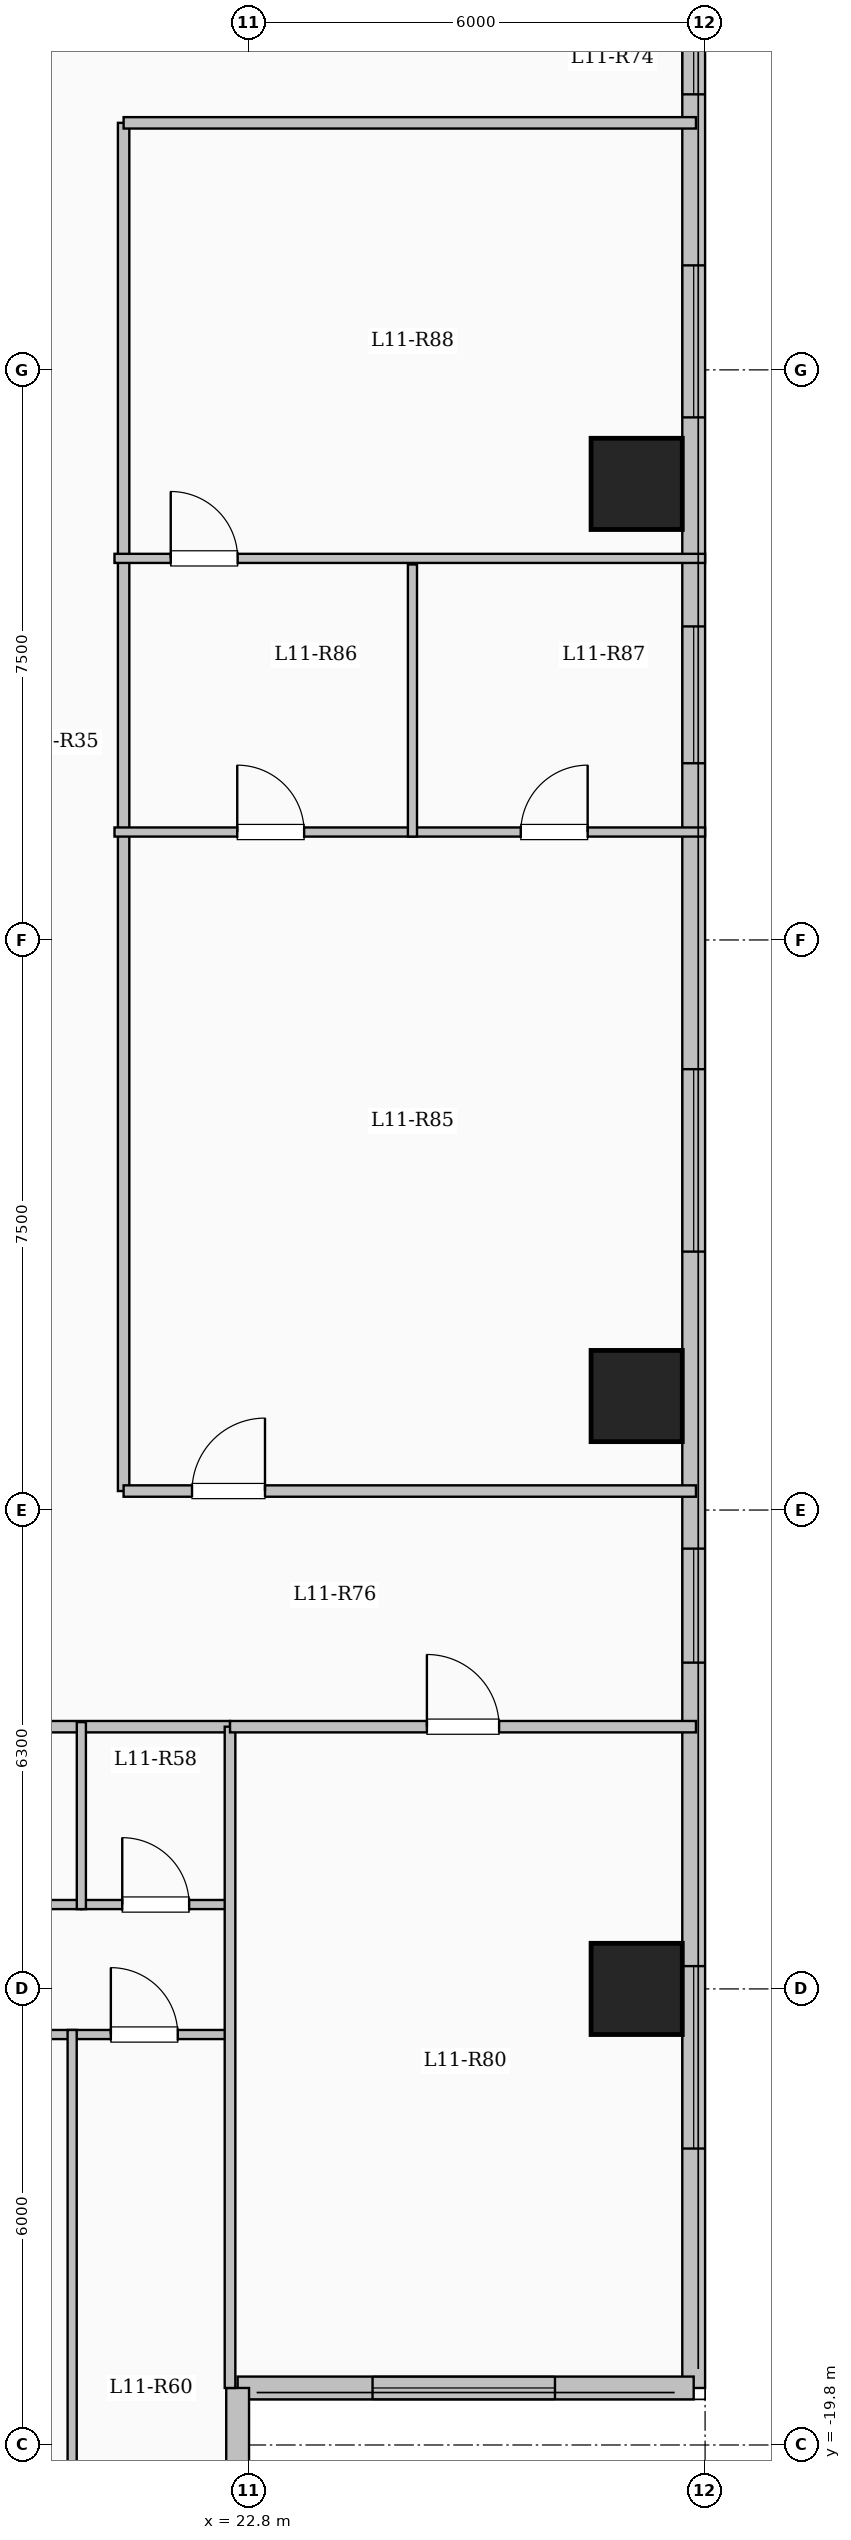
"""IFC4 building model, lengths in metres.
Left out: names, types, materials, properties, quantities, classifications, styles, units other than length and angle.
Written with IfcOpenShell. Run it as: python <this file> out.ifc"""

import sys

from ifc_helpers import new_model, si_unit, direction, frame, frame_2d, origin, origin_2d, place, context, subcontext, project, spatial, rectangle, extrude, element, fill, save


model = new_model("IFC4")
c1 = context("Model", 3, precision=1e-05, world=origin(), true_north=direction((0.0, 1.0)))
c2 = subcontext(c1, "Body", "Model", "MODEL_VIEW")
j1 = project(units=[si_unit("LENGTHUNIT", "METRE"), si_unit("PLANEANGLEUNIT", "RADIAN")], contexts=[c1])
p1 = place(None, origin())
s1 = spatial("IfcSite", under=j1, at=p1, CompositionType="ELEMENT")
p2 = place(p1, origin())
s2 = spatial("IfcBuilding", under=s1, at=p2, CompositionType="ELEMENT")
p3 = place(p2, frame((0.0, 0.0, 44.1)))
s3 = spatial("IfcBuildingStorey", under=s2, at=p3, CompositionType="ELEMENT", Elevation=44.1)
for number, where, z_axis, x_axis in (
    (1, (27.9, -13.8, 0.0), (0.0, 0.0, 1.0), (1.0, 0.0, 0.0)),
    (2, (27.9, -6.0, 0.0), (0.0, 0.0, 1.0), (1.0, 0.0, 0.0)),
    (3, (27.9, 6.0, 0.0), (0.0, 0.0, 1.0), (1.0, 0.0, 0.0)),
):
    element("IfcColumn", number, at=place(p3, frame(where, z_axis=z_axis, x_axis=x_axis)), inside=s3, PredefinedType="COLUMN", context=c2, shape_type="SweptSolid", body=[
        extrude(rectangle(XDim=1.2, YDim=1.2, at=origin_2d()), origin(), (0.0, 0.0, 1.0), 3.35),
    ])
p4 = place(p3, frame((28.65, 19.05, 0.0), z_axis=(0.0, 0.0, 1.0), x_axis=(0.0, -1.0, 0.0)))
e4 = element("IfcWall", 4, at=p4, inside=s3, PredefinedType="SOLIDWALL", context=c2, shape_type="SweptSolid", body=[
    extrude(rectangle(XDim=38.1, YDim=0.3, at=frame_2d((19.05, 0.0))), origin(), (0.0, 0.0, 1.0), 3.1),
])
p5 = place(p4, frame((2.275, 0.0, 0.9)))
e5 = element("IfcOpeningElement", 5, at=p5, cuts=e4, PredefinedType="OPENING", context=c2, shape_type="SweptSolid", body=[
    extrude(rectangle(XDim=2.0, YDim=1.7, at=frame_2d((1.0, 0.85))), frame((0.0, 0.16, 0.0), z_axis=(0.0, -1.0, 0.0), x_axis=(1.0, 0.0, 0.0)), (0.0, 0.0, 1.0), 0.32),
])
p6 = place(p4, frame((6.925, 0.0, 0.95)))
e6 = element("IfcOpeningElement", 6, at=p6, cuts=e4, PredefinedType="OPENING", context=c2, shape_type="SweptSolid", body=[
    extrude(rectangle(XDim=1.0, YDim=1.5, at=frame_2d((0.5, 0.75))), frame((0.0, 0.16, 0.0), z_axis=(0.0, -1.0, 0.0), x_axis=(1.0, 0.0, 0.0)), (0.0, 0.0, 1.0), 0.32),
])
p7 = place(p4, frame((10.175, 0.0, 0.9)))
e7 = element("IfcOpeningElement", 7, at=p7, cuts=e4, PredefinedType="OPENING", context=c2, shape_type="SweptSolid", body=[
    extrude(rectangle(XDim=2.0, YDim=1.7, at=frame_2d((1.0, 0.85))), frame((0.0, 0.16, 0.0), z_axis=(0.0, -1.0, 0.0), x_axis=(1.0, 0.0, 0.0)), (0.0, 0.0, 1.0), 0.32),
])
p8 = place(p4, frame((14.925, 0.0, 0.9)))
e8 = element("IfcOpeningElement", 8, at=p8, cuts=e4, PredefinedType="OPENING", context=c2, shape_type="SweptSolid", body=[
    extrude(rectangle(XDim=1.8, YDim=1.65, at=frame_2d((0.9, 0.825))), frame((0.0, 0.16, 0.0), z_axis=(0.0, -1.0, 0.0), x_axis=(1.0, 0.0, 0.0)), (0.0, 0.0, 1.0), 0.32),
])
p9 = place(p4, frame((20.75, 0.0, 0.9)))
e9 = element("IfcOpeningElement", 9, at=p9, cuts=e4, PredefinedType="OPENING", context=c2, shape_type="SweptSolid", body=[
    extrude(rectangle(XDim=2.4, YDim=1.8, at=frame_2d((1.2, 0.9))), frame((0.0, 0.16, 0.0), z_axis=(0.0, -1.0, 0.0), x_axis=(1.0, 0.0, 0.0)), (0.0, 0.0, 1.0), 0.32),
])
p10 = place(p4, frame((27.058, 0.0, 0.9)))
e10 = element("IfcOpeningElement", 10, at=p10, cuts=e4, PredefinedType="OPENING", context=c2, shape_type="SweptSolid", body=[
    extrude(rectangle(XDim=1.5, YDim=1.65, at=frame_2d((0.75, 0.825))), frame((0.0, 0.16, 0.0), z_axis=(0.0, -1.0, 0.0), x_axis=(1.0, 0.0, 0.0)), (0.0, 0.0, 1.0), 0.32),
])
p11 = place(p4, frame((32.55, 0.0, 0.9)))
e11 = element("IfcOpeningElement", 11, at=p11, cuts=e4, PredefinedType="OPENING", context=c2, shape_type="SweptSolid", body=[
    extrude(rectangle(XDim=2.4, YDim=1.8, at=frame_2d((1.2, 0.9))), frame((0.0, 0.16, 0.0), z_axis=(0.0, -1.0, 0.0), x_axis=(1.0, 0.0, 0.0)), (0.0, 0.0, 1.0), 0.32),
])
p12 = place(p3, frame((28.65, -19.05, 0.0), z_axis=(0.0, 0.0, 1.0), x_axis=(-1.0, 0.0, 0.0)))
e12 = element("IfcWall", 12, at=p12, inside=s3, PredefinedType="SOLIDWALL", context=c2, shape_type="SweptSolid", body=[
    extrude(rectangle(XDim=6.0, YDim=0.3, at=frame_2d((3.0, 0.0))), origin(), (0.0, 0.0, 1.0), 3.1),
])
p13 = place(p12, frame((1.825, 0.0, 0.9)))
e13 = element("IfcOpeningElement", 13, at=p13, cuts=e12, PredefinedType="OPENING", context=c2, shape_type="SweptSolid", body=[
    extrude(rectangle(XDim=2.4, YDim=1.8, at=frame_2d((1.2, 0.9))), frame((0.0, 0.16, 0.0), z_axis=(0.0, -1.0, 0.0), x_axis=(1.0, 0.0, 0.0)), (0.0, 0.0, 1.0), 0.32),
])
p14 = place(p3, frame((22.65, -19.05, 0.0), z_axis=(0.0, 0.0, 1.0), x_axis=(0.0, -1.0, 0.0)))
e14 = element("IfcWall", 14, at=p14, inside=s3, PredefinedType="SOLIDWALL", context=c2, shape_type="SweptSolid", body=[
    extrude(rectangle(XDim=4.5, YDim=0.3, at=frame_2d((2.25, 0.0))), origin(), (0.0, 0.0, 1.0), 3.1),
])
p15 = place(p14, frame((1.333, 0.0, 0.9)))
e15 = element("IfcOpeningElement", 15, at=p15, cuts=e14, PredefinedType="OPENING", context=c2, shape_type="SweptSolid", body=[
    extrude(rectangle(XDim=1.8, YDim=1.65, at=frame_2d((0.9, 0.825))), frame((0.0, 0.16, 0.0), z_axis=(0.0, -1.0, 0.0), x_axis=(1.0, 0.0, 0.0)), (0.0, 0.0, 1.0), 0.32),
])
p16 = place(p3, frame((21.15, -7.25, 0.0), z_axis=(0.0, 0.0, 1.0), x_axis=(0.0, 1.0, 0.0)))
e16 = element("IfcWall", 16, at=p16, inside=s3, PredefinedType="PARTITIONING", context=c2, shape_type="SweptSolid", body=[
    extrude(rectangle(XDim=18.0, YDim=0.15, at=frame_2d((9.0, 0.0))), origin(), (0.0, 0.0, 1.0), 2.585),
])
p17 = place(p3, frame((8.55, -10.35, 0.0), z_axis=(0.0, 0.0, 1.0), x_axis=(1.0, 0.0, 0.0)))
e17 = element("IfcWall", 17, at=p17, inside=s3, PredefinedType="PARTITIONING", context=c2, shape_type="SweptSolid", body=[
    extrude(rectangle(XDim=14.0, YDim=0.15, at=frame_2d((7.0, 0.0))), origin(), (0.0, 0.0, 1.0), 3.1),
])
p18 = place(p17, frame((0.75, 0.0, 0.0)))
e18 = element("IfcOpeningElement", 18, at=p18, cuts=e17, PredefinedType="OPENING", context=c2, shape_type="SweptSolid", body=[
    extrude(rectangle(XDim=0.96, YDim=2.15, at=frame_2d((0.48, 1.075))), frame((0.0, 0.085, 0.0), z_axis=(0.0, -1.0, 0.0), x_axis=(1.0, 0.0, 0.0)), (0.0, 0.0, 1.0), 0.17),
])
p19 = place(p17, frame((7.446, 0.0, 0.0)))
e19 = element("IfcOpeningElement", 19, at=p19, cuts=e17, PredefinedType="OPENING", context=c2, shape_type="SweptSolid", body=[
    extrude(rectangle(XDim=0.96, YDim=2.15, at=frame_2d((0.48, 1.075))), frame((0.0, 0.085, 0.0), z_axis=(0.0, -1.0, 0.0), x_axis=(1.0, 0.0, 0.0)), (0.0, 0.0, 1.0), 0.17),
])
p20 = place(p3, frame((18.456, -12.69, 0.0), z_axis=(0.0, 0.0, 1.0), x_axis=(1.0, 0.0, 0.0)))
e20 = element("IfcWall", 20, at=p20, inside=s3, PredefinedType="PARTITIONING", context=c2, shape_type="SweptSolid", body=[
    extrude(rectangle(XDim=2.138, YDim=0.12, at=frame_2d((1.069, 0.0))), origin(), (0.0, 0.0, 1.0), 3.1),
])
p21 = place(p20, frame((0.629, 0.0, 0.0)))
e21 = element("IfcOpeningElement", 21, at=p21, cuts=e20, PredefinedType="OPENING", context=c2, shape_type="SweptSolid", body=[
    extrude(rectangle(XDim=0.88, YDim=2.1, at=frame_2d((0.44, 1.05))), frame((0.0, 0.07, 0.0), z_axis=(0.0, -1.0, 0.0), x_axis=(1.0, 0.0, 0.0)), (0.0, 0.0, 1.0), 0.14),
])
p22 = place(p3, frame((20.594, -12.69, 0.0), z_axis=(0.0, 0.0, 1.0), x_axis=(1.0, 0.0, 0.0)))
e22 = element("IfcWall", 22, at=p22, inside=s3, PredefinedType="PARTITIONING", context=c2, shape_type="SweptSolid", body=[
    extrude(rectangle(XDim=1.956, YDim=0.12, at=frame_2d((0.978, 0.0))), origin(), (0.0, 0.0, 1.0), 3.1),
])
p23 = place(p22, frame((0.538, 0.0, 0.0)))
e23 = element("IfcOpeningElement", 23, at=p23, cuts=e22, PredefinedType="OPENING", context=c2, shape_type="SweptSolid", body=[
    extrude(rectangle(XDim=0.88, YDim=2.1, at=frame_2d((0.44, 1.05))), frame((0.0, 0.07, 0.0), z_axis=(0.0, -1.0, 0.0), x_axis=(1.0, 0.0, 0.0)), (0.0, 0.0, 1.0), 0.14),
])
p24 = place(p3, frame((18.396, -14.4, 0.0), z_axis=(0.0, 0.0, 1.0), x_axis=(1.0, 0.0, 0.0)))
e24 = element("IfcWall", 24, at=p24, inside=s3, PredefinedType="PARTITIONING", context=c2, shape_type="SweptSolid", body=[
    extrude(rectangle(XDim=4.214, YDim=0.12, at=frame_2d((2.107, 0.0))), origin(), (0.0, 0.0, 1.0), 3.1),
])
p25 = place(p24, frame((0.569, 0.0, 0.0)))
e25 = element("IfcOpeningElement", 25, at=p25, cuts=e24, PredefinedType="OPENING", context=c2, shape_type="SweptSolid", body=[
    extrude(rectangle(XDim=0.88, YDim=2.1, at=frame_2d((0.44, 1.05))), frame((0.0, 0.07, 0.0), z_axis=(0.0, -1.0, 0.0), x_axis=(1.0, 0.0, 0.0)), (0.0, 0.0, 1.0), 0.14),
])
p26 = place(p24, frame((2.586, 0.0, 0.0)))
e26 = element("IfcOpeningElement", 26, at=p26, cuts=e24, PredefinedType="OPENING", context=c2, shape_type="SweptSolid", body=[
    extrude(rectangle(XDim=0.88, YDim=2.1, at=frame_2d((0.44, 1.05))), frame((0.0, 0.07, 0.0), z_axis=(0.0, -1.0, 0.0), x_axis=(1.0, 0.0, 0.0)), (0.0, 0.0, 1.0), 0.14),
])
p27 = place(p3, frame((20.594, -12.75, 0.0), z_axis=(0.0, 0.0, 1.0), x_axis=(0.0, 1.0, 0.0)))
e27 = element("IfcWall", 27, at=p27, inside=s3, PredefinedType="PARTITIONING", context=c2, shape_type="SweptSolid", body=[
    extrude(rectangle(XDim=2.46, YDim=0.12, at=frame_2d((1.23, 0.0))), origin(), (0.0, 0.0, 1.0), 3.1),
])
p28 = place(p3, frame((20.473, -23.6, 0.0), z_axis=(0.0, 0.0, 1.0), x_axis=(0.0, 1.0, 0.0)))
e28 = element("IfcWall", 28, at=p28, inside=s3, PredefinedType="PARTITIONING", context=c2, shape_type="SweptSolid", body=[
    extrude(rectangle(XDim=9.26, YDim=0.12, at=frame_2d((4.63, 0.0))), origin(), (0.0, 0.0, 1.0), 3.1),
])
p29 = place(p3, frame((21.15, -7.25, 0.0), z_axis=(0.0, 0.0, 1.0), x_axis=(1.0, 0.0, 0.0)))
e29 = element("IfcWall", 29, at=p29, inside=s3, PredefinedType="PARTITIONING", context=c2, shape_type="SweptSolid", body=[
    extrude(rectangle(XDim=7.53, YDim=0.15, at=frame_2d((3.765, 0.0))), origin(), (0.0, 0.0, 1.0), 3.1),
])
p30 = place(p29, frame((0.9, 0.0, 0.0)))
e30 = element("IfcOpeningElement", 30, at=p30, cuts=e29, PredefinedType="OPENING", context=c2, shape_type="SweptSolid", body=[
    extrude(rectangle(XDim=0.96, YDim=2.15, at=frame_2d((0.48, 1.075))), frame((0.0, 0.085, 0.0), z_axis=(0.0, -1.0, 0.0), x_axis=(1.0, 0.0, 0.0)), (0.0, 0.0, 1.0), 0.17),
])
p31 = place(p3, frame((21.15, 10.75, 0.0), z_axis=(0.0, 0.0, 1.0), x_axis=(1.0, 0.0, 0.0)))
e31 = element("IfcWall", 31, at=p31, inside=s3, PredefinedType="PARTITIONING", context=c2, shape_type="SweptSolid", body=[
    extrude(rectangle(XDim=7.53, YDim=0.15, at=frame_2d((3.765, 0.0))), origin(), (0.0, 0.0, 1.0), 3.1),
])
p32 = place(p3, frame((22.55, -19.05, 0.0), z_axis=(0.0, 0.0, 1.0), x_axis=(0.0, 1.0, 0.0)))
e32 = element("IfcWall", 32, at=p32, inside=s3, PredefinedType="PARTITIONING", context=c2, shape_type="SweptSolid", body=[
    extrude(rectangle(XDim=8.7, YDim=0.14, at=frame_2d((4.35, 0.0))), origin(), (0.0, 0.0, 1.0), 3.1),
])
p33 = place(p3, frame((22.55, -10.35, 0.0), z_axis=(0.0, 0.0, 1.0), x_axis=(1.0, 0.0, 0.0)))
e33 = element("IfcWall", 33, at=p33, inside=s3, PredefinedType="PARTITIONING", context=c2, shape_type="SweptSolid", body=[
    extrude(rectangle(XDim=6.13, YDim=0.15, at=frame_2d((3.065, 0.0))), origin(), (0.0, 0.0, 1.0), 3.1),
])
p34 = place(p33, frame((2.59, 0.0, 0.0)))
e34 = element("IfcOpeningElement", 34, at=p34, cuts=e33, PredefinedType="OPENING", context=c2, shape_type="SweptSolid", body=[
    extrude(rectangle(XDim=0.95, YDim=2.15, at=frame_2d((0.475, 1.075))), frame((0.0, 0.085, 0.0), z_axis=(0.0, -1.0, 0.0), x_axis=(1.0, 0.0, 0.0)), (0.0, 0.0, 1.0), 0.17),
])
p35 = place(p3, frame((21.03, 1.42, 0.0), z_axis=(0.0, 0.0, 1.0), x_axis=(1.0, 0.0, 0.0)))
e35 = element("IfcWall", 35, at=p35, inside=s3, PredefinedType="PARTITIONING", context=c2, shape_type="SweptSolid", body=[
    extrude(rectangle(XDim=7.77, YDim=0.12, at=frame_2d((3.885, 0.0))), origin(), (0.0, 0.0, 1.0), 3.1),
])
p36 = place(p35, frame((1.615, 0.0, 0.0)))
e36 = element("IfcOpeningElement", 36, at=p36, cuts=e35, PredefinedType="OPENING", context=c2, shape_type="SweptSolid", body=[
    extrude(rectangle(XDim=0.88, YDim=2.1, at=frame_2d((0.44, 1.05))), frame((0.0, 0.07, 0.0), z_axis=(0.0, -1.0, 0.0), x_axis=(1.0, 0.0, 0.0)), (0.0, 0.0, 1.0), 0.14),
])
p37 = place(p35, frame((5.345, 0.0, 0.0)))
e37 = element("IfcOpeningElement", 37, at=p37, cuts=e35, PredefinedType="OPENING", context=c2, shape_type="SweptSolid", body=[
    extrude(rectangle(XDim=0.88, YDim=2.1, at=frame_2d((0.44, 1.05))), frame((0.0, 0.07, 0.0), z_axis=(0.0, -1.0, 0.0), x_axis=(1.0, 0.0, 0.0)), (0.0, 0.0, 1.0), 0.14),
])
p38 = place(p3, frame((21.03, 5.02, 0.0), z_axis=(0.0, 0.0, 1.0), x_axis=(1.0, 0.0, 0.0)))
e38 = element("IfcWall", 38, at=p38, inside=s3, PredefinedType="PARTITIONING", context=c2, shape_type="SweptSolid", body=[
    extrude(rectangle(XDim=7.77, YDim=0.12, at=frame_2d((3.885, 0.0))), origin(), (0.0, 0.0, 1.0), 3.1),
])
p39 = place(p38, frame((0.74, 0.0, 0.0)))
e39 = element("IfcOpeningElement", 39, at=p39, cuts=e38, PredefinedType="OPENING", context=c2, shape_type="SweptSolid", body=[
    extrude(rectangle(XDim=0.88, YDim=2.1, at=frame_2d((0.44, 1.05))), frame((0.0, 0.07, 0.0), z_axis=(0.0, -1.0, 0.0), x_axis=(1.0, 0.0, 0.0)), (0.0, 0.0, 1.0), 0.14),
])
p40 = place(p3, frame((24.95, 1.36, 0.0), z_axis=(0.0, 0.0, 1.0), x_axis=(0.0, 1.0, 0.0)))
e40 = element("IfcWall", 40, at=p40, inside=s3, PredefinedType="PARTITIONING", context=c2, shape_type="SweptSolid", body=[
    extrude(rectangle(XDim=3.58, YDim=0.12, at=frame_2d((1.79, 0.0))), origin(), (0.0, 0.0, 1.0), 3.1),
])
p41 = place(p6, origin())
e41 = element("IfcWindow", 41, at=p41, inside=s3, PartitioningType="SINGLE_PANEL", PredefinedType="WINDOW", context=c2, shape_type="SweptSolid", body=[
    extrude(rectangle(XDim=1.0, YDim=1.5, at=frame_2d((0.5, 0.75))), frame((0.0, 0.03, 0.0), z_axis=(0.0, -1.0, 0.0), x_axis=(1.0, 0.0, 0.0)), (0.0, 0.0, 1.0), 0.06),
])
fill(e6, e41)
p42 = place(p7, origin())
e42 = element("IfcWindow", 42, at=p42, inside=s3, PartitioningType="SINGLE_PANEL", PredefinedType="WINDOW", context=c2, shape_type="SweptSolid", body=[
    extrude(rectangle(XDim=2.0, YDim=1.7, at=frame_2d((1.0, 0.85))), frame((0.0, 0.03, 0.0), z_axis=(0.0, -1.0, 0.0), x_axis=(1.0, 0.0, 0.0)), (0.0, 0.0, 1.0), 0.06),
])
fill(e7, e42)
p43 = place(p8, origin())
e43 = element("IfcWindow", 43, at=p43, inside=s3, PartitioningType="SINGLE_PANEL", PredefinedType="WINDOW", context=c2, shape_type="SweptSolid", body=[
    extrude(rectangle(XDim=1.8, YDim=1.65, at=frame_2d((0.9, 0.825))), frame((0.0, 0.03, 0.0), z_axis=(0.0, -1.0, 0.0), x_axis=(1.0, 0.0, 0.0)), (0.0, 0.0, 1.0), 0.06),
])
fill(e8, e43)
p44 = place(p9, origin())
e44 = element("IfcWindow", 44, at=p44, inside=s3, PartitioningType="SINGLE_PANEL", PredefinedType="WINDOW", context=c2, shape_type="SweptSolid", body=[
    extrude(rectangle(XDim=2.4, YDim=1.8, at=frame_2d((1.2, 0.9))), frame((0.0, 0.03, 0.0), z_axis=(0.0, -1.0, 0.0), x_axis=(1.0, 0.0, 0.0)), (0.0, 0.0, 1.0), 0.06),
])
fill(e9, e44)
p45 = place(p10, origin())
e45 = element("IfcWindow", 45, at=p45, inside=s3, PartitioningType="SINGLE_PANEL", PredefinedType="WINDOW", context=c2, shape_type="SweptSolid", body=[
    extrude(rectangle(XDim=1.5, YDim=1.65, at=frame_2d((0.75, 0.825))), frame((0.0, 0.03, 0.0), z_axis=(0.0, -1.0, 0.0), x_axis=(1.0, 0.0, 0.0)), (0.0, 0.0, 1.0), 0.06),
])
fill(e10, e45)
p46 = place(p11, origin())
e46 = element("IfcWindow", 46, at=p46, inside=s3, PartitioningType="SINGLE_PANEL", PredefinedType="WINDOW", context=c2, shape_type="SweptSolid", body=[
    extrude(rectangle(XDim=2.4, YDim=1.8, at=frame_2d((1.2, 0.9))), frame((0.0, 0.03, 0.0), z_axis=(0.0, -1.0, 0.0), x_axis=(1.0, 0.0, 0.0)), (0.0, 0.0, 1.0), 0.06),
])
fill(e11, e46)
p47 = place(p13, origin())
e47 = element("IfcWindow", 47, at=p47, inside=s3, PartitioningType="SINGLE_PANEL", PredefinedType="WINDOW", context=c2, shape_type="SweptSolid", body=[
    extrude(rectangle(XDim=2.4, YDim=1.8, at=frame_2d((1.2, 0.9))), frame((0.0, 0.03, 0.0), z_axis=(0.0, -1.0, 0.0), x_axis=(1.0, 0.0, 0.0)), (0.0, 0.0, 1.0), 0.06),
])
fill(e13, e47)
p48 = place(p23, origin())
e48 = element("IfcDoor", 48, at=p48, inside=s3, OperationType="SINGLE_SWING_LEFT", PredefinedType="DOOR", context=c2, shape_type="SweptSolid", body=[
    extrude(rectangle(XDim=0.88, YDim=2.1, at=frame_2d((0.44, 1.05))), frame((0.0, 0.025, 0.0), z_axis=(0.0, -1.0, 0.0), x_axis=(1.0, 0.0, 0.0)), (0.0, 0.0, 1.0), 0.05),
])
fill(e23, e48)
p49 = place(p26, origin())
e49 = element("IfcDoor", 49, at=p49, inside=s3, OperationType="SINGLE_SWING_LEFT", PredefinedType="DOOR", context=c2, shape_type="SweptSolid", body=[
    extrude(rectangle(XDim=0.88, YDim=2.1, at=frame_2d((0.44, 1.05))), frame((0.0, 0.025, 0.0), z_axis=(0.0, -1.0, 0.0), x_axis=(1.0, 0.0, 0.0)), (0.0, 0.0, 1.0), 0.05),
])
fill(e26, e49)
p50 = place(p34, origin())
e50 = element("IfcDoor", 50, at=p50, inside=s3, OperationType="SINGLE_SWING_LEFT", PredefinedType="DOOR", context=c2, shape_type="SweptSolid", body=[
    extrude(rectangle(XDim=0.95, YDim=2.15, at=frame_2d((0.475, 1.075))), frame((0.0, 0.025, 0.0), z_axis=(0.0, -1.0, 0.0), x_axis=(1.0, 0.0, 0.0)), (0.0, 0.0, 1.0), 0.05),
])
fill(e34, e50)
p51 = place(p30, origin())
e51 = element("IfcDoor", 51, at=p51, inside=s3, OperationType="SINGLE_SWING_RIGHT", PredefinedType="DOOR", context=c2, shape_type="SweptSolid", body=[
    extrude(rectangle(XDim=0.96, YDim=2.15, at=frame_2d((0.48, 1.075))), frame((0.0, 0.025, 0.0), z_axis=(0.0, -1.0, 0.0), x_axis=(1.0, 0.0, 0.0)), (0.0, 0.0, 1.0), 0.05),
])
fill(e30, e51)
p52 = place(p36, origin())
e52 = element("IfcDoor", 52, at=p52, inside=s3, OperationType="SINGLE_SWING_LEFT", PredefinedType="DOOR", context=c2, shape_type="SweptSolid", body=[
    extrude(rectangle(XDim=0.88, YDim=2.1, at=frame_2d((0.44, 1.05))), frame((0.0, 0.025, 0.0), z_axis=(0.0, -1.0, 0.0), x_axis=(1.0, 0.0, 0.0)), (0.0, 0.0, 1.0), 0.05),
])
fill(e36, e52)
p53 = place(p37, origin())
e53 = element("IfcDoor", 53, at=p53, inside=s3, OperationType="SINGLE_SWING_RIGHT", PredefinedType="DOOR", context=c2, shape_type="SweptSolid", body=[
    extrude(rectangle(XDim=0.88, YDim=2.1, at=frame_2d((0.44, 1.05))), frame((0.0, 0.025, 0.0), z_axis=(0.0, -1.0, 0.0), x_axis=(1.0, 0.0, 0.0)), (0.0, 0.0, 1.0), 0.05),
])
fill(e37, e53)
p54 = place(p39, origin())
e54 = element("IfcDoor", 54, at=p54, inside=s3, OperationType="SINGLE_SWING_LEFT", PredefinedType="DOOR", context=c2, shape_type="SweptSolid", body=[
    extrude(rectangle(XDim=0.88, YDim=2.1, at=frame_2d((0.44, 1.05))), frame((0.0, 0.025, 0.0), z_axis=(0.0, -1.0, 0.0), x_axis=(1.0, 0.0, 0.0)), (0.0, 0.0, 1.0), 0.05),
])
fill(e39, e54)
save(model, sys.argv[1])
